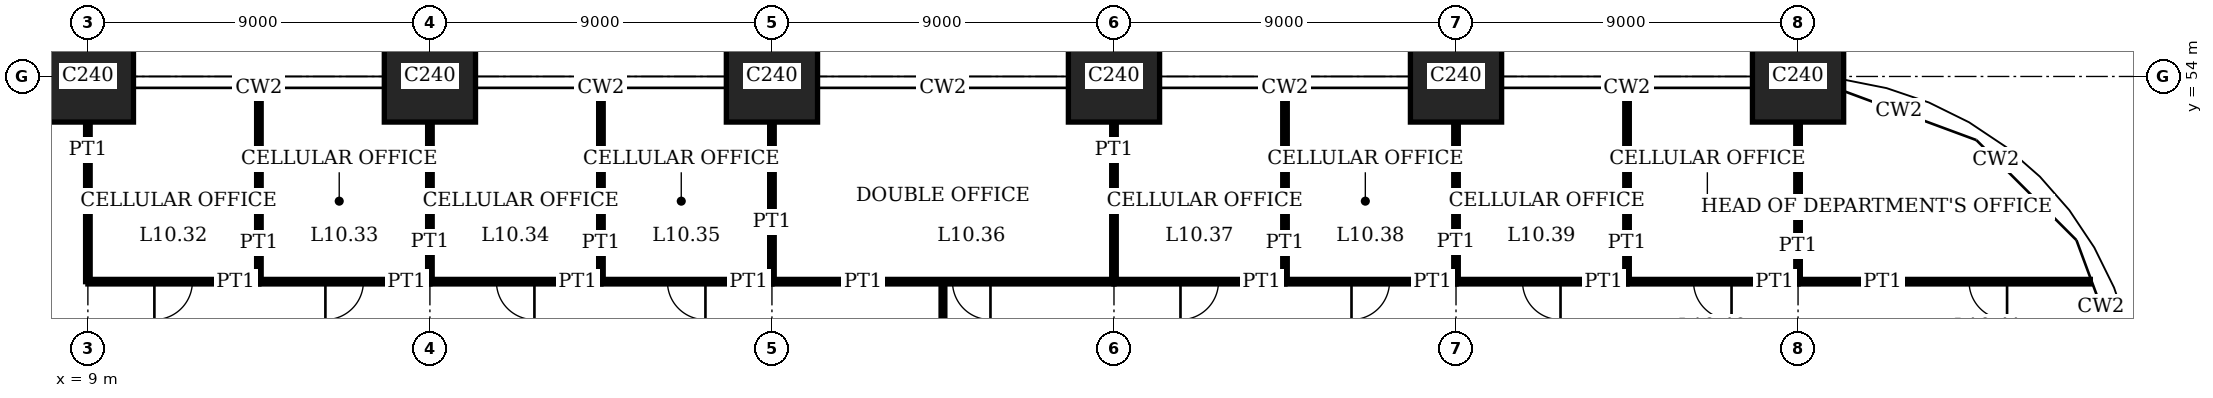
"""IFC4 building model, lengths in metres.
Left out: names, types, materials, properties, quantities, classifications, styles, units other than length and angle.
Written with IfcOpenShell. Run it as: python <this file> out.ifc"""

import sys

from ifc_helpers import new_model, si_unit, direction, frame, frame_2d, origin, origin_2d, place, context, subcontext, project, spatial, rectangle, extrude, element, fill, save


model = new_model("IFC4")
c1 = context("Model", 3, precision=1e-05, world=origin(), true_north=direction((0.0, 1.0)))
c2 = subcontext(c1, "Body", "Model", "MODEL_VIEW")
j1 = project(units=[si_unit("LENGTHUNIT", "METRE"), si_unit("PLANEANGLEUNIT", "RADIAN")], contexts=[c1])
p1 = place(None, origin())
s1 = spatial("IfcSite", under=j1, at=p1, CompositionType="ELEMENT")
p2 = place(p1, origin())
s2 = spatial("IfcBuilding", under=s1, at=p2, CompositionType="ELEMENT")
p3 = place(p2, frame((0.0, 0.0, 43.8)))
s3 = spatial("IfcBuildingStorey", under=s2, at=p3, CompositionType="ELEMENT", Elevation=43.8)
for number, where, z_axis, x_axis in (
    (1, (9.0, 54.0, 0.0), (0.0, 0.0, 1.0), (1.0, 0.0, 0.0)),
    (2, (18.0, 54.0, 0.0), (0.0, 0.0, 1.0), (1.0, 0.0, 0.0)),
    (3, (27.0, 54.0, 0.0), (0.0, 0.0, 1.0), (1.0, 0.0, 0.0)),
    (4, (36.0, 54.0, 0.0), (0.0, 0.0, 1.0), (1.0, 0.0, 0.0)),
    (5, (45.0, 54.0, 0.0), (0.0, 0.0, 1.0), (1.0, 0.0, 0.0)),
    (6, (54.0, 54.0, 0.0), (0.0, 0.0, 1.0), (1.0, 0.0, 0.0)),
):
    element("IfcColumn", number, at=place(p3, frame(where, z_axis=z_axis, x_axis=x_axis)), inside=s3, PredefinedType="COLUMN", context=c2, shape_type="SweptSolid", body=[
        extrude(rectangle(XDim=2.4, YDim=2.4, at=origin_2d()), origin(), (0.0, 0.0, 1.0), 4.0),
    ])
p4 = place(p3, frame((9.0, 48.6, 0.0), z_axis=(0.0, 0.0, 1.0), x_axis=(1.0, 0.0, 0.0)))
e7 = element("IfcWall", 7, at=p4, inside=s3, PredefinedType="PARTITIONING", context=c2, shape_type="SweptSolid", body=[
    extrude(rectangle(XDim=4.5, YDim=0.12, at=frame_2d((2.25, 0.0))), origin(), (0.0, 0.0, 1.0), 3.75),
])
p5 = place(p4, frame((1.75, 0.0, 0.0)))
e8 = element("IfcOpeningElement", 8, at=p5, cuts=e7, PredefinedType="OPENING", context=c2, shape_type="SweptSolid", body=[
    extrude(rectangle(XDim=1.0, YDim=2.4, at=frame_2d((0.5, 1.2))), frame((0.0, 0.07, 0.0), z_axis=(0.0, -1.0, 0.0), x_axis=(1.0, 0.0, 0.0)), (0.0, 0.0, 1.0), 0.14),
])
p6 = place(p3, frame((13.5, 48.6, 0.0), z_axis=(0.0, 0.0, 1.0), x_axis=(1.0, 0.0, 0.0)))
e9 = element("IfcWall", 9, at=p6, inside=s3, PredefinedType="PARTITIONING", context=c2, shape_type="SweptSolid", body=[
    extrude(rectangle(XDim=4.5, YDim=0.12, at=frame_2d((2.25, 0.0))), origin(), (0.0, 0.0, 1.0), 3.75),
])
p7 = place(p6, frame((1.75, 0.0, 0.0)))
e10 = element("IfcOpeningElement", 10, at=p7, cuts=e9, PredefinedType="OPENING", context=c2, shape_type="SweptSolid", body=[
    extrude(rectangle(XDim=1.0, YDim=2.4, at=frame_2d((0.5, 1.2))), frame((0.0, 0.07, 0.0), z_axis=(0.0, -1.0, 0.0), x_axis=(1.0, 0.0, 0.0)), (0.0, 0.0, 1.0), 0.14),
])
p8 = place(p3, frame((18.0, 48.6, 0.0), z_axis=(0.0, 0.0, 1.0), x_axis=(1.0, 0.0, 0.0)))
e11 = element("IfcWall", 11, at=p8, inside=s3, PredefinedType="PARTITIONING", context=c2, shape_type="SweptSolid", body=[
    extrude(rectangle(XDim=4.5, YDim=0.12, at=frame_2d((2.25, 0.0))), origin(), (0.0, 0.0, 1.0), 3.75),
])
p9 = place(p8, frame((1.75, 0.0, 0.0)))
e12 = element("IfcOpeningElement", 12, at=p9, cuts=e11, PredefinedType="OPENING", context=c2, shape_type="SweptSolid", body=[
    extrude(rectangle(XDim=1.0, YDim=2.4, at=frame_2d((0.5, 1.2))), frame((0.0, 0.07, 0.0), z_axis=(0.0, -1.0, 0.0), x_axis=(1.0, 0.0, 0.0)), (0.0, 0.0, 1.0), 0.14),
])
p10 = place(p3, frame((22.5, 48.6, 0.0), z_axis=(0.0, 0.0, 1.0), x_axis=(1.0, 0.0, 0.0)))
e13 = element("IfcWall", 13, at=p10, inside=s3, PredefinedType="PARTITIONING", context=c2, shape_type="SweptSolid", body=[
    extrude(rectangle(XDim=4.5, YDim=0.12, at=frame_2d((2.25, 0.0))), origin(), (0.0, 0.0, 1.0), 3.75),
])
p11 = place(p10, frame((1.75, 0.0, 0.0)))
e14 = element("IfcOpeningElement", 14, at=p11, cuts=e13, PredefinedType="OPENING", context=c2, shape_type="SweptSolid", body=[
    extrude(rectangle(XDim=1.0, YDim=2.4, at=frame_2d((0.5, 1.2))), frame((0.0, 0.07, 0.0), z_axis=(0.0, -1.0, 0.0), x_axis=(1.0, 0.0, 0.0)), (0.0, 0.0, 1.0), 0.14),
])
p12 = place(p3, frame((27.0, 48.6, 0.0), z_axis=(0.0, 0.0, 1.0), x_axis=(1.0, 0.0, 0.0)))
e15 = element("IfcWall", 15, at=p12, inside=s3, PredefinedType="PARTITIONING", context=c2, shape_type="SweptSolid", body=[
    extrude(rectangle(XDim=9.0, YDim=0.12, at=frame_2d((4.5, 0.0))), origin(), (0.0, 0.0, 1.0), 3.75),
])
p13 = place(p12, frame((4.75, 0.0, 0.0)))
e16 = element("IfcOpeningElement", 16, at=p13, cuts=e15, PredefinedType="OPENING", context=c2, shape_type="SweptSolid", body=[
    extrude(rectangle(XDim=1.0, YDim=2.4, at=frame_2d((0.5, 1.2))), frame((0.0, 0.07, 0.0), z_axis=(0.0, -1.0, 0.0), x_axis=(1.0, 0.0, 0.0)), (0.0, 0.0, 1.0), 0.14),
])
p14 = place(p3, frame((36.0, 48.6, 0.0), z_axis=(0.0, 0.0, 1.0), x_axis=(1.0, 0.0, 0.0)))
e17 = element("IfcWall", 17, at=p14, inside=s3, PredefinedType="PARTITIONING", context=c2, shape_type="SweptSolid", body=[
    extrude(rectangle(XDim=4.5, YDim=0.12, at=frame_2d((2.25, 0.0))), origin(), (0.0, 0.0, 1.0), 3.75),
])
p15 = place(p14, frame((1.75, 0.0, 0.0)))
e18 = element("IfcOpeningElement", 18, at=p15, cuts=e17, PredefinedType="OPENING", context=c2, shape_type="SweptSolid", body=[
    extrude(rectangle(XDim=1.0, YDim=2.4, at=frame_2d((0.5, 1.2))), frame((0.0, 0.07, 0.0), z_axis=(0.0, -1.0, 0.0), x_axis=(1.0, 0.0, 0.0)), (0.0, 0.0, 1.0), 0.14),
])
p16 = place(p3, frame((40.5, 48.6, 0.0), z_axis=(0.0, 0.0, 1.0), x_axis=(1.0, 0.0, 0.0)))
e19 = element("IfcWall", 19, at=p16, inside=s3, PredefinedType="PARTITIONING", context=c2, shape_type="SweptSolid", body=[
    extrude(rectangle(XDim=4.5, YDim=0.12, at=frame_2d((2.25, 0.0))), origin(), (0.0, 0.0, 1.0), 3.75),
])
p17 = place(p16, frame((1.75, 0.0, 0.0)))
e20 = element("IfcOpeningElement", 20, at=p17, cuts=e19, PredefinedType="OPENING", context=c2, shape_type="SweptSolid", body=[
    extrude(rectangle(XDim=1.0, YDim=2.4, at=frame_2d((0.5, 1.2))), frame((0.0, 0.07, 0.0), z_axis=(0.0, -1.0, 0.0), x_axis=(1.0, 0.0, 0.0)), (0.0, 0.0, 1.0), 0.14),
])
p18 = place(p3, frame((45.0, 48.6, 0.0), z_axis=(0.0, 0.0, 1.0), x_axis=(1.0, 0.0, 0.0)))
e21 = element("IfcWall", 21, at=p18, inside=s3, PredefinedType="PARTITIONING", context=c2, shape_type="SweptSolid", body=[
    extrude(rectangle(XDim=4.5, YDim=0.12, at=frame_2d((2.25, 0.0))), origin(), (0.0, 0.0, 1.0), 3.75),
])
p19 = place(p18, frame((1.75, 0.0, 0.0)))
e22 = element("IfcOpeningElement", 22, at=p19, cuts=e21, PredefinedType="OPENING", context=c2, shape_type="SweptSolid", body=[
    extrude(rectangle(XDim=1.0, YDim=2.4, at=frame_2d((0.5, 1.2))), frame((0.0, 0.07, 0.0), z_axis=(0.0, -1.0, 0.0), x_axis=(1.0, 0.0, 0.0)), (0.0, 0.0, 1.0), 0.14),
])
p20 = place(p3, frame((49.5, 48.6, 0.0), z_axis=(0.0, 0.0, 1.0), x_axis=(1.0, 0.0, 0.0)))
e23 = element("IfcWall", 23, at=p20, inside=s3, PredefinedType="PARTITIONING", context=c2, shape_type="SweptSolid", body=[
    extrude(rectangle(XDim=4.5, YDim=0.12, at=frame_2d((2.25, 0.0))), origin(), (0.0, 0.0, 1.0), 3.75),
])
p21 = place(p20, frame((1.75, 0.0, 0.0)))
e24 = element("IfcOpeningElement", 24, at=p21, cuts=e23, PredefinedType="OPENING", context=c2, shape_type="SweptSolid", body=[
    extrude(rectangle(XDim=1.0, YDim=2.4, at=frame_2d((0.5, 1.2))), frame((0.0, 0.07, 0.0), z_axis=(0.0, -1.0, 0.0), x_axis=(1.0, 0.0, 0.0)), (0.0, 0.0, 1.0), 0.14),
])
p22 = place(p3, frame((54.0, 48.6, 0.0), z_axis=(0.0, 0.0, 1.0), x_axis=(1.0, 0.0, 0.0)))
e25 = element("IfcWall", 25, at=p22, inside=s3, PredefinedType="PARTITIONING", context=c2, shape_type="SweptSolid", body=[
    extrude(rectangle(XDim=7.69, YDim=0.12, at=frame_2d((3.845, 0.0))), origin(), (0.0, 0.0, 1.0), 3.75),
])
p23 = place(p22, frame((4.5, 0.0, 0.0)))
e26 = element("IfcOpeningElement", 26, at=p23, cuts=e25, PredefinedType="OPENING", context=c2, shape_type="SweptSolid", body=[
    extrude(rectangle(XDim=1.0, YDim=2.4, at=frame_2d((0.5, 1.2))), frame((0.0, 0.07, 0.0), z_axis=(0.0, -1.0, 0.0), x_axis=(1.0, 0.0, 0.0)), (0.0, 0.0, 1.0), 0.14),
])
p24 = place(p3, frame((9.0, 48.6, 0.0), z_axis=(0.0, 0.0, 1.0), x_axis=(0.0, 1.0, 0.0)))
e27 = element("IfcWall", 27, at=p24, inside=s3, PredefinedType="PARTITIONING", context=c2, shape_type="SweptSolid", body=[
    extrude(rectangle(XDim=4.2, YDim=0.12, at=frame_2d((2.1, 0.0))), origin(), (0.0, 0.0, 1.0), 3.05),
])
p25 = place(p3, frame((13.5, 48.6, 0.0), z_axis=(0.0, 0.0, 1.0), x_axis=(0.0, 1.0, 0.0)))
e28 = element("IfcWall", 28, at=p25, inside=s3, PredefinedType="PARTITIONING", context=c2, shape_type="SweptSolid", body=[
    extrude(rectangle(XDim=5.09, YDim=0.12, at=frame_2d((2.545, 0.0))), origin(), (0.0, 0.0, 1.0), 3.75),
])
p26 = place(p3, frame((18.0, 48.6, 0.0), z_axis=(0.0, 0.0, 1.0), x_axis=(0.0, 1.0, 0.0)))
e29 = element("IfcWall", 29, at=p26, inside=s3, PredefinedType="PARTITIONING", context=c2, shape_type="SweptSolid", body=[
    extrude(rectangle(XDim=4.2, YDim=0.12, at=frame_2d((2.1, 0.0))), origin(), (0.0, 0.0, 1.0), 3.05),
])
p27 = place(p3, frame((22.5, 48.6, 0.0), z_axis=(0.0, 0.0, 1.0), x_axis=(0.0, 1.0, 0.0)))
e30 = element("IfcWall", 30, at=p27, inside=s3, PredefinedType="PARTITIONING", context=c2, shape_type="SweptSolid", body=[
    extrude(rectangle(XDim=5.09, YDim=0.12, at=frame_2d((2.545, 0.0))), origin(), (0.0, 0.0, 1.0), 3.75),
])
p28 = place(p3, frame((27.0, 48.6, 0.0), z_axis=(0.0, 0.0, 1.0), x_axis=(0.0, 1.0, 0.0)))
e31 = element("IfcWall", 31, at=p28, inside=s3, PredefinedType="PARTITIONING", context=c2, shape_type="SweptSolid", body=[
    extrude(rectangle(XDim=4.2, YDim=0.12, at=frame_2d((2.1, 0.0))), origin(), (0.0, 0.0, 1.0), 3.05),
])
p29 = place(p3, frame((31.5, 38.35, 0.0), z_axis=(0.0, 0.0, 1.0), x_axis=(0.0, 1.0, 0.0)))
e32 = element("IfcWall", 32, at=p29, inside=s3, PredefinedType="PARTITIONING", context=c2, shape_type="SweptSolid", body=[
    extrude(rectangle(XDim=10.26, YDim=0.1, at=frame_2d((5.13, 0.0))), origin(), (0.0, 0.0, 1.0), 3.75),
])
p30 = place(p3, frame((36.0, 48.6, 0.0), z_axis=(0.0, 0.0, 1.0), x_axis=(0.0, 1.0, 0.0)))
e33 = element("IfcWall", 33, at=p30, inside=s3, PredefinedType="PARTITIONING", context=c2, shape_type="SweptSolid", body=[
    extrude(rectangle(XDim=4.2, YDim=0.12, at=frame_2d((2.1, 0.0))), origin(), (0.0, 0.0, 1.0), 3.05),
])
p31 = place(p3, frame((40.5, 48.6, 0.0), z_axis=(0.0, 0.0, 1.0), x_axis=(0.0, 1.0, 0.0)))
e34 = element("IfcWall", 34, at=p31, inside=s3, PredefinedType="PARTITIONING", context=c2, shape_type="SweptSolid", body=[
    extrude(rectangle(XDim=5.09, YDim=0.12, at=frame_2d((2.545, 0.0))), origin(), (0.0, 0.0, 1.0), 3.75),
])
p32 = place(p3, frame((45.0, 48.6, 0.0), z_axis=(0.0, 0.0, 1.0), x_axis=(0.0, 1.0, 0.0)))
e35 = element("IfcWall", 35, at=p32, inside=s3, PredefinedType="PARTITIONING", context=c2, shape_type="SweptSolid", body=[
    extrude(rectangle(XDim=4.2, YDim=0.12, at=frame_2d((2.1, 0.0))), origin(), (0.0, 0.0, 1.0), 3.05),
])
p33 = place(p3, frame((49.5, 48.6, 0.0), z_axis=(0.0, 0.0, 1.0), x_axis=(0.0, 1.0, 0.0)))
e36 = element("IfcWall", 36, at=p33, inside=s3, PredefinedType="PARTITIONING", context=c2, shape_type="SweptSolid", body=[
    extrude(rectangle(XDim=5.09, YDim=0.12, at=frame_2d((2.545, 0.0))), origin(), (0.0, 0.0, 1.0), 3.75),
])
p34 = place(p3, frame((54.0, 48.6, 0.0), z_axis=(0.0, 0.0, 1.0), x_axis=(0.0, 1.0, 0.0)))
e37 = element("IfcWall", 37, at=p34, inside=s3, PredefinedType="PARTITIONING", context=c2, shape_type="SweptSolid", body=[
    extrude(rectangle(XDim=4.2, YDim=0.12, at=frame_2d((2.1, 0.0))), origin(), (0.0, 0.0, 1.0), 3.05),
])
p35 = place(p5, origin())
e38 = element("IfcDoor", 38, at=p35, inside=s3, OperationType="SINGLE_SWING_LEFT", PredefinedType="DOOR", context=c2, shape_type="SweptSolid", body=[
    extrude(rectangle(XDim=1.0, YDim=2.4, at=frame_2d((0.5, 1.2))), frame((0.0, 0.025, 0.0), z_axis=(0.0, -1.0, 0.0), x_axis=(1.0, 0.0, 0.0)), (0.0, 0.0, 1.0), 0.05),
])
fill(e8, e38)
p36 = place(p7, origin())
e39 = element("IfcDoor", 39, at=p36, inside=s3, OperationType="SINGLE_SWING_LEFT", PredefinedType="DOOR", context=c2, shape_type="SweptSolid", body=[
    extrude(rectangle(XDim=1.0, YDim=2.4, at=frame_2d((0.5, 1.2))), frame((0.0, 0.025, 0.0), z_axis=(0.0, -1.0, 0.0), x_axis=(1.0, 0.0, 0.0)), (0.0, 0.0, 1.0), 0.05),
])
fill(e10, e39)
p37 = place(p9, origin())
e40 = element("IfcDoor", 40, at=p37, inside=s3, OperationType="SINGLE_SWING_RIGHT", PredefinedType="DOOR", context=c2, shape_type="SweptSolid", body=[
    extrude(rectangle(XDim=1.0, YDim=2.4, at=frame_2d((0.5, 1.2))), frame((0.0, 0.025, 0.0), z_axis=(0.0, -1.0, 0.0), x_axis=(1.0, 0.0, 0.0)), (0.0, 0.0, 1.0), 0.05),
])
fill(e12, e40)
p38 = place(p11, origin())
e41 = element("IfcDoor", 41, at=p38, inside=s3, OperationType="SINGLE_SWING_RIGHT", PredefinedType="DOOR", context=c2, shape_type="SweptSolid", body=[
    extrude(rectangle(XDim=1.0, YDim=2.4, at=frame_2d((0.5, 1.2))), frame((0.0, 0.025, 0.0), z_axis=(0.0, -1.0, 0.0), x_axis=(1.0, 0.0, 0.0)), (0.0, 0.0, 1.0), 0.05),
])
fill(e14, e41)
p39 = place(p13, origin())
e42 = element("IfcDoor", 42, at=p39, inside=s3, OperationType="SINGLE_SWING_RIGHT", PredefinedType="DOOR", context=c2, shape_type="SweptSolid", body=[
    extrude(rectangle(XDim=1.0, YDim=2.4, at=frame_2d((0.5, 1.2))), frame((0.0, 0.025, 0.0), z_axis=(0.0, -1.0, 0.0), x_axis=(1.0, 0.0, 0.0)), (0.0, 0.0, 1.0), 0.05),
])
fill(e16, e42)
p40 = place(p15, origin())
e43 = element("IfcDoor", 43, at=p40, inside=s3, OperationType="SINGLE_SWING_LEFT", PredefinedType="DOOR", context=c2, shape_type="SweptSolid", body=[
    extrude(rectangle(XDim=1.0, YDim=2.4, at=frame_2d((0.5, 1.2))), frame((0.0, 0.025, 0.0), z_axis=(0.0, -1.0, 0.0), x_axis=(1.0, 0.0, 0.0)), (0.0, 0.0, 1.0), 0.05),
])
fill(e18, e43)
p41 = place(p17, origin())
e44 = element("IfcDoor", 44, at=p41, inside=s3, OperationType="SINGLE_SWING_LEFT", PredefinedType="DOOR", context=c2, shape_type="SweptSolid", body=[
    extrude(rectangle(XDim=1.0, YDim=2.4, at=frame_2d((0.5, 1.2))), frame((0.0, 0.025, 0.0), z_axis=(0.0, -1.0, 0.0), x_axis=(1.0, 0.0, 0.0)), (0.0, 0.0, 1.0), 0.05),
])
fill(e20, e44)
p42 = place(p19, origin())
e45 = element("IfcDoor", 45, at=p42, inside=s3, OperationType="SINGLE_SWING_RIGHT", PredefinedType="DOOR", context=c2, shape_type="SweptSolid", body=[
    extrude(rectangle(XDim=1.0, YDim=2.4, at=frame_2d((0.5, 1.2))), frame((0.0, 0.025, 0.0), z_axis=(0.0, -1.0, 0.0), x_axis=(1.0, 0.0, 0.0)), (0.0, 0.0, 1.0), 0.05),
])
fill(e22, e45)
p43 = place(p21, origin())
e46 = element("IfcDoor", 46, at=p43, inside=s3, OperationType="SINGLE_SWING_RIGHT", PredefinedType="DOOR", context=c2, shape_type="SweptSolid", body=[
    extrude(rectangle(XDim=1.0, YDim=2.4, at=frame_2d((0.5, 1.2))), frame((0.0, 0.025, 0.0), z_axis=(0.0, -1.0, 0.0), x_axis=(1.0, 0.0, 0.0)), (0.0, 0.0, 1.0), 0.05),
])
fill(e24, e46)
p44 = place(p23, origin())
e47 = element("IfcDoor", 47, at=p44, inside=s3, OperationType="SINGLE_SWING_RIGHT", PredefinedType="DOOR", context=c2, shape_type="SweptSolid", body=[
    extrude(rectangle(XDim=1.0, YDim=2.4, at=frame_2d((0.5, 1.2))), frame((0.0, 0.025, 0.0), z_axis=(0.0, -1.0, 0.0), x_axis=(1.0, 0.0, 0.0)), (0.0, 0.0, 1.0), 0.05),
])
fill(e26, e47)
save(model, sys.argv[1])
